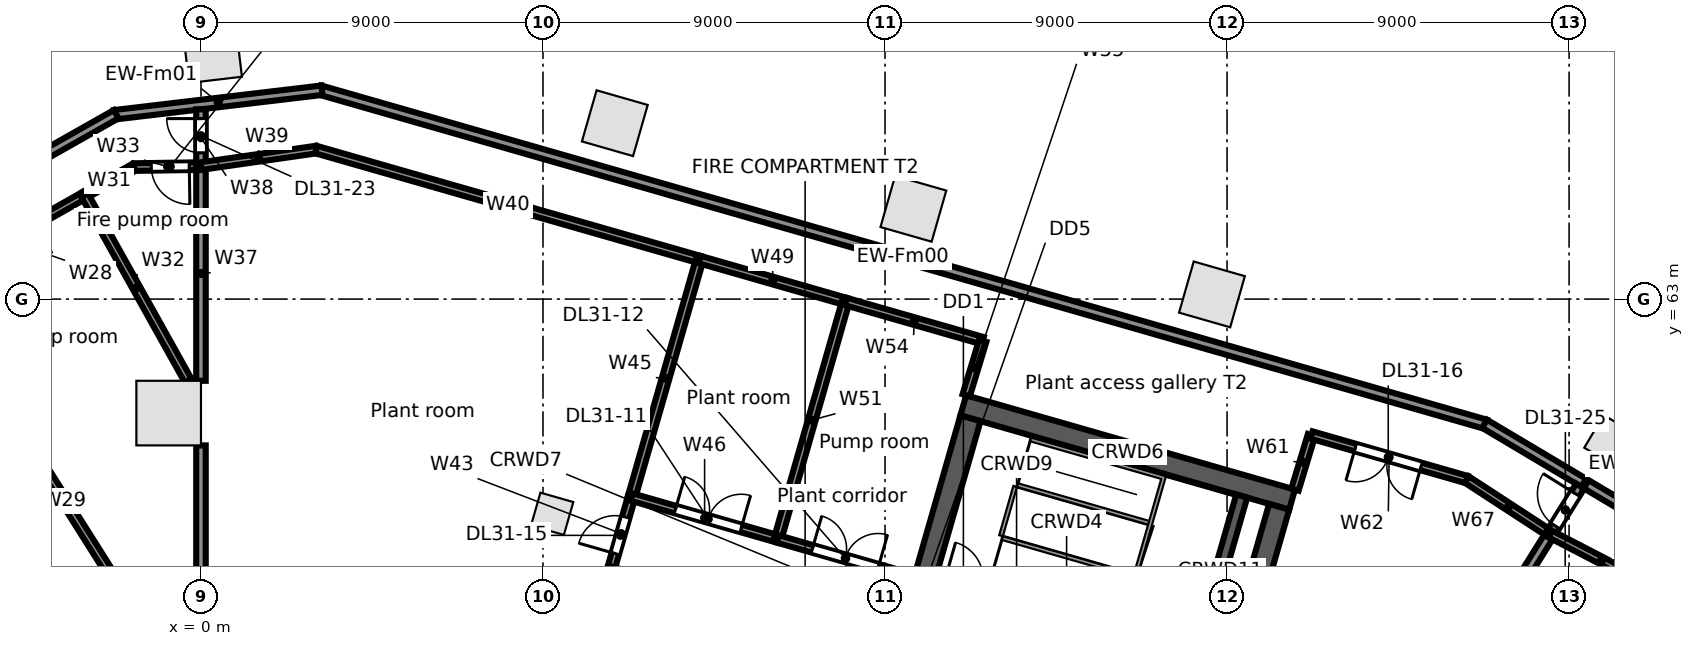
"""IFC4 building model, lengths in metres.
Left out: names, types, materials, properties, quantities, classifications, styles, units other than length and angle.
Written with IfcOpenShell. Run it as: python <this file> out.ifc"""

import sys

from ifc_helpers import new_model, si_unit, direction, frame, frame_2d, origin, origin_2d, place, context, subcontext, project, spatial, rectangle, extrude, element, fill, save


model = new_model("IFC4")
c1 = context("Model", 3, precision=1e-05, world=origin(), true_north=direction((0.0, 1.0)))
c2 = subcontext(c1, "Body", "Model", "MODEL_VIEW")
j1 = project(units=[si_unit("LENGTHUNIT", "METRE"), si_unit("PLANEANGLEUNIT", "RADIAN")], contexts=[c1])
p1 = place(None, origin())
s1 = spatial("IfcSite", under=j1, at=p1, CompositionType="ELEMENT")
p2 = place(p1, origin())
s2 = spatial("IfcBuilding", under=s1, at=p2, CompositionType="ELEMENT")
p3 = place(p2, frame((0.0, 0.0, 149.9)))
s3 = spatial("IfcBuildingStorey", under=s2, at=p3, CompositionType="ELEMENT", Elevation=149.9)
p4 = place(p3, frame((37.085, 59.262, 0.0), z_axis=(0.0, 0.0, 1.0), x_axis=(-0.859406411501, 0.511293086077, 0.0)))
e1 = element("IfcColumn", 1, at=p4, inside=s3, PredefinedType="COLUMN", context=c2, shape_type="SweptSolid", body=[
    extrude(rectangle(XDim=1.0, YDim=1.0, at=origin_2d()), origin(), (0.0, 0.0, 1.0), 4.68),
])
for number, where, z_axis, x_axis in (
    (2, (26.603, 63.124, 0.0), (0.0, 0.0, 1.0), (-0.961, 0.276, 0.0)),
    (3, (18.746, 65.376, 0.0), (0.0, 0.0, 1.0), (-0.961, 0.276, 0.0)),
    (4, (10.89, 67.629, 0.0), (0.0, 0.0, 1.0), (-0.961, 0.276, 0.0)),
    (5, (0.3, 69.464, 0.0), (0.0, 0.0, 1.0), (-0.993, -0.118, 0.0)),
):
    element("IfcColumn", number, at=place(p3, frame(where, z_axis=z_axis, x_axis=x_axis)), inside=s3, PredefinedType="COLUMN", context=c2, shape_type="SweptSolid", body=[
        extrude(rectangle(XDim=1.4, YDim=1.4, at=origin_2d()), origin(), (0.0, 0.0, 1.0), 5.0),
    ])
p5 = place(p3, frame((-0.85, 60.0, 0.0), z_axis=(0.0, 0.0, 1.0), x_axis=(0.0, 1.0, 0.0)))
e6 = element("IfcColumn", 6, at=p5, inside=s3, PredefinedType="COLUMN", context=c2, shape_type="SweptSolid", body=[
    extrude(rectangle(XDim=1.7, YDim=1.7, at=origin_2d()), origin(), (0.0, 0.0, 1.0), 5.0),
])
p6 = place(p3, frame((9.241, 57.35, 0.0), z_axis=(0.0, 0.0, 1.0), x_axis=(0.961261695938, -0.275637355817, 0.0)))
e7 = element("IfcColumn", 7, at=p6, inside=s3, PredefinedType="COLUMN", context=c2, shape_type="SweptSolid", body=[
    extrude(rectangle(XDim=0.9, YDim=0.9, at=origin_2d()), origin(), (0.0, 0.0, 1.0), 5.0),
])
p7 = place(p3, frame((3.135, 68.5, 0.0), z_axis=(0.0, 0.0, 1.0), x_axis=(0.961261620067, -0.275637620413, 0.0)))
e8 = element("IfcWall", 8, at=p7, inside=s3, PredefinedType="STANDARD", context=c2, shape_type="SweptSolid", body=[
    extrude(rectangle(XDim=31.907, YDim=0.25, at=frame_2d((15.953, 0.0))), origin(), (0.0, 0.0, 1.0), 3.768),
])
p8 = place(p3, frame((-2.278, 67.85, 0.0), z_axis=(0.0, 0.0, 1.0), x_axis=(0.993072509993, 0.117503148449, 0.0)))
e9 = element("IfcWall", 9, at=p8, inside=s3, PredefinedType="STANDARD", context=c2, shape_type="SweptSolid", body=[
    extrude(rectangle(XDim=5.5, YDim=0.25, at=frame_2d((2.75, 0.0))), origin(), (0.0, 0.0, 1.0), 3.768),
])
p9 = place(p3, frame((-56.251, 37.302, 0.0), z_axis=(0.0, 0.0, 1.0), x_axis=(0.87035543516, 0.49242402103, 0.0)))
e10 = element("IfcWall", 10, at=p9, inside=s3, PredefinedType="STANDARD", context=c2, shape_type="SweptSolid", body=[
    extrude(rectangle(XDim=62.067, YDim=0.25, at=frame_2d((31.033, 0.0))), origin(), (0.0, 0.0, 1.0), 3.872),
])
p10 = place(p3, frame((33.776, 59.719, 0.0), z_axis=(0.0, 0.0, 1.0), x_axis=(0.859411998598, -0.511283694896, 0.0)))
e11 = element("IfcWall", 11, at=p10, inside=s3, PredefinedType="STANDARD", context=c2, shape_type="SweptSolid", body=[
    extrude(rectangle(XDim=6.155, YDim=0.25, at=frame_2d((3.077, 0.0))), origin(), (0.0, 0.0, 1.0), 3.972),
])
p11 = place(p3, frame((20.06, 60.204, 0.0), z_axis=(0.0, 0.0, 1.0), x_axis=(0.96126248289, -0.275634611374, 0.0)))
e12 = element("IfcWall", 12, at=p11, inside=s3, PredefinedType="SOLIDWALL", context=c2, shape_type="SweptSolid", body=[
    extrude(rectangle(XDim=9.0, YDim=0.55, at=frame_2d((4.5, 0.0))), origin(), (0.0, 0.0, 1.0), 4.68),
])
p12 = place(p3, frame((17.244, 49.386, 0.0), z_axis=(0.0, 0.0, 1.0), x_axis=(0.275632146085, 0.96126318979, 0.0)))
e13 = element("IfcWall", 13, at=p12, inside=s3, PredefinedType="SOLIDWALL", context=c2, shape_type="SweptSolid", body=[
    extrude(rectangle(XDim=10.9, YDim=0.55, at=frame_2d((5.45, 0.0))), origin(), (0.0, 0.0, 1.0), 4.68),
])
p13 = place(p12, frame((4.85, 0.0, 0.0)))
e14 = element("IfcOpeningElement", 14, at=p13, cuts=e13, PredefinedType="OPENING", context=c2, shape_type="SweptSolid", body=[
    extrude(rectangle(XDim=1.2, YDim=2.1, at=frame_2d((0.6, 1.05))), frame((0.0, 0.285, 0.0), z_axis=(0.0, -1.0, 0.0), x_axis=(1.0, 0.0, 0.0)), (0.0, 0.0, 1.0), 0.57),
])
p14 = place(p3, frame((26.256, 53.876, 0.0), z_axis=(0.0, 0.0, 1.0), x_axis=(0.275641165445, 0.961260603537, 0.0)))
e15 = element("IfcWall", 15, at=p14, inside=s3, PredefinedType="SOLIDWALL", context=c2, shape_type="SweptSolid", body=[
    extrude(rectangle(XDim=4.1, YDim=0.3, at=frame_2d((2.05, 0.0))), origin(), (0.0, 0.0, 1.0), 4.68),
])
p15 = place(p3, frame((25.366, 47.057, 0.0), z_axis=(0.0, 0.0, 1.0), x_axis=(0.275632146085, 0.96126318979, 0.0)))
e16 = element("IfcWall", 16, at=p15, inside=s3, PredefinedType="SOLIDWALL", context=c2, shape_type="SweptSolid", body=[
    extrude(rectangle(XDim=10.9, YDim=0.55, at=frame_2d((5.45, 0.0))), origin(), (0.0, 0.0, 1.0), 4.68),
])
p16 = place(p15, frame((4.85, 0.0, 0.0)))
e17 = element("IfcOpeningElement", 17, at=p16, cuts=e16, PredefinedType="OPENING", context=c2, shape_type="SweptSolid", body=[
    extrude(rectangle(XDim=1.2, YDim=2.1, at=frame_2d((0.6, 1.05))), frame((0.0, 0.285, 0.0), z_axis=(0.0, -1.0, 0.0), x_axis=(1.0, 0.0, 0.0)), (0.0, 0.0, 1.0), 0.57),
])
p17 = place(p3, frame((-7.196, 63.397, 0.0), z_axis=(0.0, 0.0, 1.0), x_axis=(0.870338743261, 0.492453522659, 0.0)))
e18 = element("IfcWall", 18, at=p17, inside=s3, PredefinedType="PARTITIONING", context=c2, shape_type="SweptSolid", body=[
    extrude(rectangle(XDim=4.75, YDim=0.2, at=frame_2d((2.375, 0.0))), origin(), (0.0, 0.0, 1.0), 4.68),
])
p18 = place(p17, frame((1.45, 0.0, 0.0)))
e19 = element("IfcOpeningElement", 19, at=p18, cuts=e18, PredefinedType="OPENING", context=c2, shape_type="SweptSolid", body=[
    extrude(rectangle(XDim=1.8, YDim=2.1, at=frame_2d((0.9, 1.05))), frame((0.0, 0.11, 0.0), z_axis=(0.0, -1.0, 0.0), x_axis=(1.0, 0.0, 0.0)), (0.0, 0.0, 1.0), 0.22),
])
p19 = place(p3, frame((-7.196, 63.397, 0.0), z_axis=(0.0, 0.0, 1.0), x_axis=(0.533884631006, -0.845557331454, 0.0)))
e20 = element("IfcWall", 20, at=p19, inside=s3, PredefinedType="PARTITIONING", context=c2, shape_type="SweptSolid", body=[
    extrude(rectangle(XDim=13.479, YDim=0.2, at=frame_2d((6.739, 0.0))), origin(), (0.0, 0.0, 1.0), 3.748),
])
p20 = place(p3, frame((-3.062, 65.736, 0.0), z_axis=(0.0, 0.0, 1.0), x_axis=(0.870429354291, 0.492293346683, 0.0)))
e21 = element("IfcWall", 21, at=p20, inside=s3, PredefinedType="PARTITIONING", context=c2, shape_type="SweptSolid", body=[
    extrude(rectangle(XDim=1.499, YDim=0.2, at=frame_2d((0.75, 0.0))), origin(), (0.0, 0.0, 1.0), 4.68),
])
p21 = place(p3, frame((-3.062, 65.736, 0.0), z_axis=(0.0, 0.0, 1.0), x_axis=(0.487364611917, -0.873198565649, 0.0)))
e22 = element("IfcWall", 22, at=p21, inside=s3, PredefinedType="PARTITIONING", context=c2, shape_type="SweptSolid", body=[
    extrude(rectangle(XDim=5.595, YDim=0.2, at=frame_2d((2.798, 0.0))), origin(), (0.0, 0.0, 1.0), 3.96),
])
p22 = place(p3, frame((-1.757, 66.474, 0.0), z_axis=(0.0, 0.0, 1.0), x_axis=(0.999891555363, 0.014726761827, 0.0)))
e23 = element("IfcWall", 23, at=p22, inside=s3, PredefinedType="PARTITIONING", context=c2, shape_type="SweptSolid", body=[
    extrude(rectangle(XDim=1.757, YDim=0.2, at=frame_2d((0.879, 0.0))), origin(), (0.0, 0.0, 1.0), 3.96),
])
p23 = place(p22, frame((0.45, 0.0, 0.0)))
e24 = element("IfcOpeningElement", 24, at=p23, cuts=e23, PredefinedType="OPENING", context=c2, shape_type="SweptSolid", body=[
    extrude(rectangle(XDim=1.0, YDim=2.1, at=frame_2d((0.5, 1.05))), frame((0.0, 0.11, 0.0), z_axis=(0.0, -1.0, 0.0), x_axis=(1.0, 0.0, 0.0)), (0.0, 0.0, 1.0), 0.22),
])
p24 = place(p3, frame((0.0, 52.0, 0.0), z_axis=(0.0, 0.0, 1.0), x_axis=(0.0, 1.0, 0.0)))
e25 = element("IfcWall", 25, at=p24, inside=s3, PredefinedType="PARTITIONING", context=c2, shape_type="SweptSolid", body=[
    extrude(rectangle(XDim=7.15, YDim=0.25, at=frame_2d((3.575, 0.0))), origin(), (0.0, 0.0, 1.0), 4.68),
])
p25 = place(p3, frame((0.0, 60.85, 0.0), z_axis=(0.0, 0.0, 1.0), x_axis=(0.0, 1.0, 0.0)))
e26 = element("IfcWall", 26, at=p25, inside=s3, PredefinedType="PARTITIONING", context=c2, shape_type="SweptSolid", body=[
    extrude(rectangle(XDim=5.65, YDim=0.25, at=frame_2d((2.825, 0.0))), origin(), (0.0, 0.0, 1.0), 3.96),
])
p26 = place(p3, frame((0.0, 66.5, 0.0), z_axis=(0.0, 0.0, 1.0), x_axis=(0.0, 1.0, 0.0)))
e27 = element("IfcWall", 27, at=p26, inside=s3, PredefinedType="PARTITIONING", context=c2, shape_type="SweptSolid", body=[
    extrude(rectangle(XDim=1.494, YDim=0.25, at=frame_2d((0.747, 0.0))), origin(), (0.0, 0.0, 1.0), 3.96),
])
p27 = place(p26, frame((0.35, 0.0, 0.0)))
e28 = element("IfcOpeningElement", 28, at=p27, cuts=e27, PredefinedType="OPENING", context=c2, shape_type="SweptSolid", body=[
    extrude(rectangle(XDim=0.9, YDim=2.1, at=frame_2d((0.45, 1.05))), frame((0.0, 0.135, 0.0), z_axis=(0.0, -1.0, 0.0), x_axis=(1.0, 0.0, 0.0)), (0.0, 0.0, 1.0), 0.27),
])
p28 = place(p3, frame((0.0, 66.5, 0.0), z_axis=(0.0, 0.0, 1.0), x_axis=(0.989887165849, 0.1418569663, 0.0)))
e29 = element("IfcWall", 29, at=p28, inside=s3, PredefinedType="PARTITIONING", context=c2, shape_type="SweptSolid", body=[
    extrude(rectangle(XDim=3.06, YDim=0.2, at=frame_2d((1.53, 0.0))), origin(), (0.0, 0.0, 1.0), 3.748),
])
p29 = place(p3, frame((3.029, 66.934, 0.0), z_axis=(0.0, 0.0, 1.0), x_axis=(0.961263796718, -0.275630029421, 0.0)))
e30 = element("IfcWall", 30, at=p29, inside=s3, PredefinedType="PARTITIONING", context=c2, shape_type="SweptSolid", body=[
    extrude(rectangle(XDim=10.5, YDim=0.2, at=frame_2d((5.25, 0.0))), origin(), (0.0, 0.0, 1.0), 3.748),
])
p30 = place(p3, frame((10.779, 55.869, 0.0), z_axis=(0.0, 0.0, 1.0), x_axis=(0.275575706981, 0.961279371318, 0.0)))
e31 = element("IfcWall", 31, at=p30, inside=s3, PredefinedType="PARTITIONING", context=c2, shape_type="SweptSolid", body=[
    extrude(rectangle(XDim=2.0, YDim=0.2, at=frame_2d((1.0, 0.0))), origin(), (0.0, 0.0, 1.0), 3.748),
])
p31 = place(p30, frame((0.45, 0.0, 0.0)))
e32 = element("IfcOpeningElement", 32, at=p31, cuts=e31, PredefinedType="OPENING", context=c2, shape_type="SweptSolid", body=[
    extrude(rectangle(XDim=1.0, YDim=2.1, at=frame_2d((0.5, 1.05))), frame((0.0, 0.11, 0.0), z_axis=(0.0, -1.0, 0.0), x_axis=(1.0, 0.0, 0.0)), (0.0, 0.0, 1.0), 0.22),
])
p32 = place(p3, frame((11.33, 57.791, 0.0), z_axis=(0.0, 0.0, 1.0), x_axis=(0.27565349575, 0.96125706774, 0.0)))
e33 = element("IfcWall", 33, at=p32, inside=s3, PredefinedType="PARTITIONING", context=c2, shape_type="SweptSolid", body=[
    extrude(rectangle(XDim=6.501, YDim=0.2, at=frame_2d((3.25, 0.0))), origin(), (0.0, 0.0, 1.0), 3.748),
])
p33 = place(p3, frame((11.33, 57.791, 0.0), z_axis=(0.0, 0.0, 1.0), x_axis=(0.961293276216, -0.275527198479, 0.0)))
e34 = element("IfcWall", 34, at=p33, inside=s3, PredefinedType="PARTITIONING", context=c2, shape_type="SweptSolid", body=[
    extrude(rectangle(XDim=4.0, YDim=0.2, at=frame_2d((2.0, 0.0))), origin(), (0.0, 0.0, 1.0), 4.68),
])
p34 = place(p33, frame((1.2, 0.0, 0.0)))
e35 = element("IfcOpeningElement", 35, at=p34, cuts=e34, PredefinedType="OPENING", context=c2, shape_type="SweptSolid", body=[
    extrude(rectangle(XDim=1.8, YDim=2.1, at=frame_2d((0.9, 1.05))), frame((0.0, 0.11, 0.0), z_axis=(0.0, -1.0, 0.0), x_axis=(1.0, 0.0, 0.0)), (0.0, 0.0, 1.0), 0.22),
])
p35 = place(p3, frame((13.122, 64.04, 0.0), z_axis=(0.0, 0.0, 1.0), x_axis=(0.961228587008, -0.275752794216, 0.0)))
e36 = element("IfcWall", 36, at=p35, inside=s3, PredefinedType="PARTITIONING", context=c2, shape_type="SweptSolid", body=[
    extrude(rectangle(XDim=4.0, YDim=0.2, at=frame_2d((2.0, 0.0))), origin(), (0.0, 0.0, 1.0), 3.748),
])
p36 = place(p3, frame((15.175, 56.689, 0.0), z_axis=(0.0, 0.0, 1.0), x_axis=(0.275693305607, 0.961245650832, 0.0)))
e37 = element("IfcWall", 37, at=p36, inside=s3, PredefinedType="PARTITIONING", context=c2, shape_type="SweptSolid", body=[
    extrude(rectangle(XDim=6.5, YDim=0.2, at=frame_2d((3.25, 0.0))), origin(), (0.0, 0.0, 1.0), 4.68),
])
p37 = place(p3, frame((15.175, 56.689, 0.0), z_axis=(0.0, 0.0, 1.0), x_axis=(0.961281280398, -0.27556904753, 0.0)))
e38 = element("IfcWall", 38, at=p37, inside=s3, PredefinedType="PARTITIONING", context=c2, shape_type="SweptSolid", body=[
    extrude(rectangle(XDim=3.726, YDim=0.2, at=frame_2d((1.863, 0.0))), origin(), (0.0, 0.0, 1.0), 3.748),
])
p38 = place(p37, frame((0.95, 0.0, 0.0)))
e39 = element("IfcOpeningElement", 39, at=p38, cuts=e38, PredefinedType="OPENING", context=c2, shape_type="SweptSolid", body=[
    extrude(rectangle(XDim=1.8, YDim=2.1, at=frame_2d((0.9, 1.05))), frame((0.0, 0.11, 0.0), z_axis=(0.0, -1.0, 0.0), x_axis=(1.0, 0.0, 0.0)), (0.0, 0.0, 1.0), 0.22),
])
p39 = place(p3, frame((16.967, 62.937, 0.0), z_axis=(0.0, 0.0, 1.0), x_axis=(0.961314848061, -0.275451924837, 0.0)))
e40 = element("IfcWall", 40, at=p39, inside=s3, PredefinedType="PARTITIONING", context=c2, shape_type="SweptSolid", body=[
    extrude(rectangle(XDim=3.75, YDim=0.2, at=frame_2d((1.875, 0.0))), origin(), (0.0, 0.0, 1.0), 3.748),
])
for number, where, z_axis, x_axis in (
    (41, (20.136, 60.468, 0.0), (0.0, 0.0, 1.0), (0.291, 0.957, 0.0)),
    (42, (28.787, 57.987, 0.0), (0.0, 0.0, 1.0), (0.29, 0.957, 0.0)),
):
    element("IfcWall", number, at=place(p3, frame(where, z_axis=z_axis, x_axis=x_axis)), inside=s3, PredefinedType="PARTITIONING", context=c2, shape_type="SweptSolid", body=[
        extrude(rectangle(XDim=1.501, YDim=0.2, at=frame_2d((0.75, 0.0))), origin(), (0.0, 0.0, 1.0), 4.68),
    ])
p40 = place(p3, frame((29.223, 59.423, 0.0), z_axis=(0.0, 0.0, 1.0), x_axis=(0.961217704803, -0.27579072496, 0.0)))
e43 = element("IfcWall", 43, at=p40, inside=s3, PredefinedType="PARTITIONING", context=c2, shape_type="SweptSolid", body=[
    extrude(rectangle(XDim=4.25, YDim=0.2, at=frame_2d((2.125, 0.0))), origin(), (0.0, 0.0, 1.0), 4.68),
])
p41 = place(p40, frame((1.2, 0.0, 0.0)))
e44 = element("IfcOpeningElement", 44, at=p41, cuts=e43, PredefinedType="OPENING", context=c2, shape_type="SweptSolid", body=[
    extrude(rectangle(XDim=1.8, YDim=2.1, at=frame_2d((0.9, 1.05))), frame((0.0, 0.11, 0.0), z_axis=(0.0, -1.0, 0.0), x_axis=(1.0, 0.0, 0.0)), (0.0, 0.0, 1.0), 0.22),
])
p42 = place(p3, frame((32.325, 51.731, 0.0), z_axis=(0.0, 0.0, 1.0), x_axis=(0.529980652467, 0.848009733441, 0.0)))
e45 = element("IfcWall", 45, at=p42, inside=s3, PredefinedType="PARTITIONING", context=c2, shape_type="SweptSolid", body=[
    extrude(rectangle(XDim=6.0, YDim=0.25, at=frame_2d((3.0, 0.0))), origin(), (0.0, 0.0, 1.0), 4.68),
])
p43 = place(p3, frame((33.308, 58.251, 0.0), z_axis=(0.0, 0.0, 1.0), x_axis=(0.837749484824, -0.546054759779, 0.0)))
e46 = element("IfcWall", 46, at=p43, inside=s3, PredefinedType="PARTITIONING", context=c2, shape_type="SweptSolid", body=[
    extrude(rectangle(XDim=2.622, YDim=0.2, at=frame_2d((1.311, 0.0))), origin(), (0.0, 0.0, 1.0), 3.952),
])
p44 = place(p3, frame((35.505, 56.819, 0.0), z_axis=(0.0, 0.0, 1.0), x_axis=(0.529998940003, 0.847998304005, 0.0)))
e47 = element("IfcWall", 47, at=p44, inside=s3, PredefinedType="PARTITIONING", context=c2, shape_type="SweptSolid", body=[
    extrude(rectangle(XDim=1.483, YDim=0.25, at=frame_2d((0.742, 0.0))), origin(), (0.0, 0.0, 1.0), 3.952),
])
p45 = place(p44, frame((0.25, 0.0, 0.0)))
e48 = element("IfcOpeningElement", 48, at=p45, cuts=e47, PredefinedType="OPENING", context=c2, shape_type="SweptSolid", body=[
    extrude(rectangle(XDim=1.0, YDim=2.1, at=frame_2d((0.5, 1.05))), frame((0.0, 0.135, 0.0), z_axis=(0.0, -1.0, 0.0), x_axis=(1.0, 0.0, 0.0)), (0.0, 0.0, 1.0), 0.27),
])
p46 = place(p3, frame((35.505, 56.819, 0.0), z_axis=(0.0, 0.0, 1.0), x_axis=(0.887881146957, -0.460072895179, 0.0)))
e49 = element("IfcWall", 49, at=p46, inside=s3, PredefinedType="PARTITIONING", context=c2, shape_type="SweptSolid", body=[
    extrude(rectangle(XDim=3.034, YDim=0.2, at=frame_2d((1.517, 0.0))), origin(), (0.0, 0.0, 1.0), 4.68),
])
p47 = place(p23, frame((1.0, 0.0, 0.0), z_axis=(0.0, 0.0, 1.0), x_axis=(-1.0, 0.0, 0.0)))
e50 = element("IfcDoor", 50, at=p47, inside=s3, OperationType="SINGLE_SWING_LEFT", PredefinedType="DOOR", context=c2, shape_type="SweptSolid", body=[
    extrude(rectangle(XDim=1.0, YDim=2.1, at=frame_2d((0.5, 1.05))), frame((0.0, 0.025, 0.0), z_axis=(0.0, -1.0, 0.0), x_axis=(1.0, 0.0, 0.0)), (0.0, 0.0, 1.0), 0.05),
])
fill(e24, e50)
p48 = place(p34, origin())
e51 = element("IfcDoor", 51, at=p48, inside=s3, OperationType="DOUBLE_DOOR_SINGLE_SWING", PredefinedType="DOOR", context=c2, shape_type="SweptSolid", body=[
    extrude(rectangle(XDim=1.8, YDim=2.1, at=frame_2d((0.9, 1.05))), frame((0.0, 0.025, 0.0), z_axis=(0.0, -1.0, 0.0), x_axis=(1.0, 0.0, 0.0)), (0.0, 0.0, 1.0), 0.05),
])
fill(e35, e51)
p49 = place(p38, origin())
e52 = element("IfcDoor", 52, at=p49, inside=s3, OperationType="DOUBLE_DOOR_SINGLE_SWING", PredefinedType="DOOR", context=c2, shape_type="SweptSolid", body=[
    extrude(rectangle(XDim=1.8, YDim=2.1, at=frame_2d((0.9, 1.05))), frame((0.0, 0.025, 0.0), z_axis=(0.0, -1.0, 0.0), x_axis=(1.0, 0.0, 0.0)), (0.0, 0.0, 1.0), 0.05),
])
fill(e39, e52)
p50 = place(p31, origin())
e53 = element("IfcDoor", 53, at=p50, inside=s3, OperationType="SINGLE_SWING_LEFT", PredefinedType="DOOR", context=c2, shape_type="SweptSolid", body=[
    extrude(rectangle(XDim=1.0, YDim=2.1, at=frame_2d((0.5, 1.05))), frame((0.0, 0.025, 0.0), z_axis=(0.0, -1.0, 0.0), x_axis=(1.0, 0.0, 0.0)), (0.0, 0.0, 1.0), 0.05),
])
fill(e32, e53)
p51 = place(p41, frame((1.8, 0.0, 0.0), z_axis=(0.0, 0.0, 1.0), x_axis=(-1.0, 0.0, 0.0)))
e54 = element("IfcDoor", 54, at=p51, inside=s3, OperationType="DOUBLE_DOOR_SINGLE_SWING", PredefinedType="DOOR", context=c2, shape_type="SweptSolid", body=[
    extrude(rectangle(XDim=1.8, YDim=2.1, at=frame_2d((0.9, 1.05))), frame((0.0, 0.025, 0.0), z_axis=(0.0, -1.0, 0.0), x_axis=(1.0, 0.0, 0.0)), (0.0, 0.0, 1.0), 0.05),
])
fill(e44, e54)
p52 = place(p27, origin())
e55 = element("IfcDoor", 55, at=p52, inside=s3, OperationType="SINGLE_SWING_RIGHT", PredefinedType="DOOR", context=c2, shape_type="SweptSolid", body=[
    extrude(rectangle(XDim=0.9, YDim=2.1, at=frame_2d((0.45, 1.05))), frame((0.0, 0.025, 0.0), z_axis=(0.0, -1.0, 0.0), x_axis=(1.0, 0.0, 0.0)), (0.0, 0.0, 1.0), 0.05),
])
fill(e28, e55)
p53 = place(p45, origin())
e56 = element("IfcDoor", 56, at=p53, inside=s3, OperationType="SINGLE_SWING_RIGHT", PredefinedType="DOOR", context=c2, shape_type="SweptSolid", body=[
    extrude(rectangle(XDim=1.0, YDim=2.1, at=frame_2d((0.5, 1.05))), frame((0.0, 0.025, 0.0), z_axis=(0.0, -1.0, 0.0), x_axis=(1.0, 0.0, 0.0)), (0.0, 0.0, 1.0), 0.05),
])
fill(e48, e56)
save(model, sys.argv[1])
